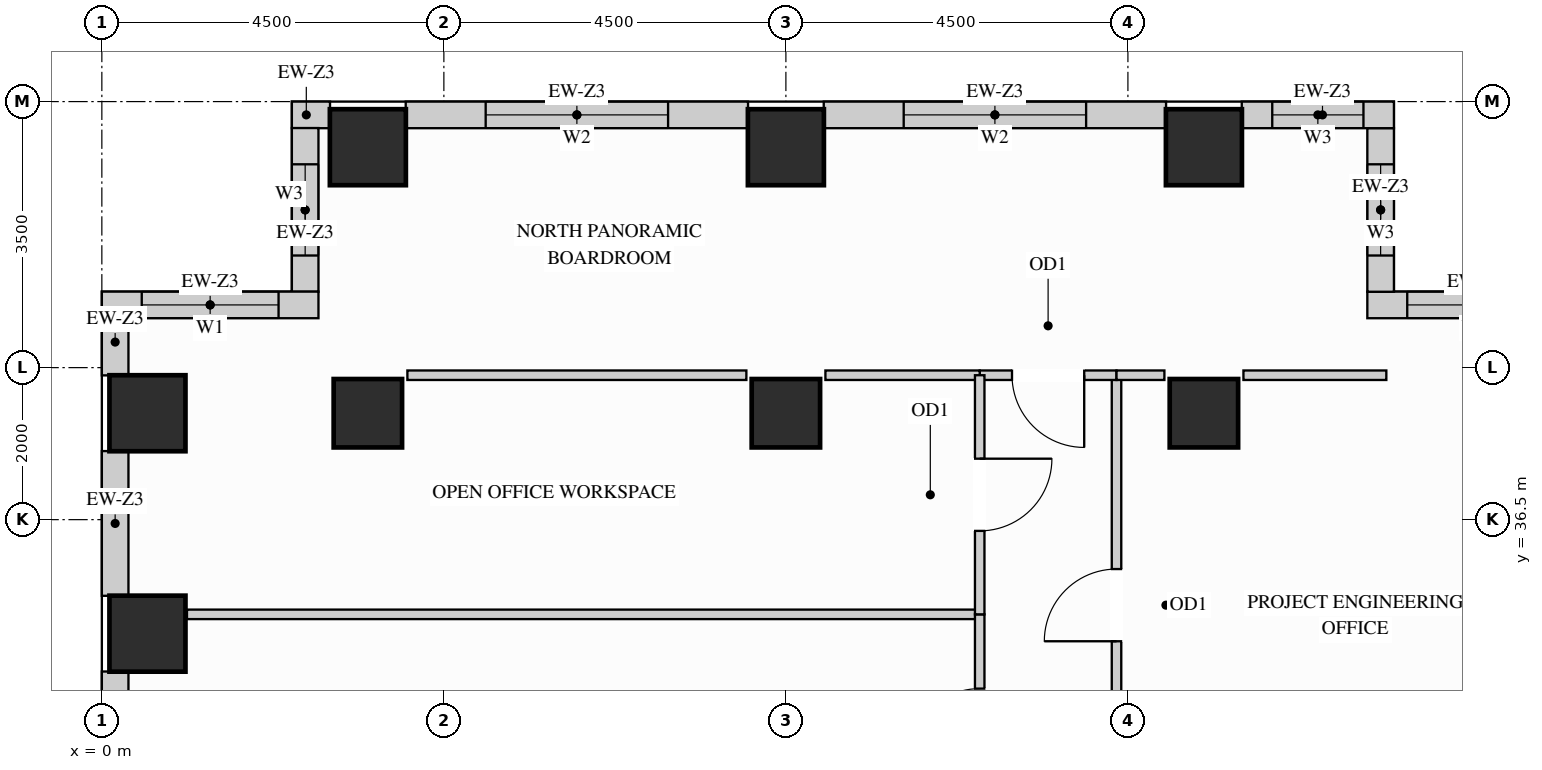
"""IFC4 building model, lengths in metres.
Left out: names, types, materials, properties, quantities, classifications, styles, units other than length and angle.
Written with IfcOpenShell. Run it as: python <this file> out.ifc"""

import sys

from ifc_helpers import new_model, si_unit, direction, frame, frame_2d, origin, origin_2d, place, context, subcontext, project, spatial, rectangle, extrude, source, transform, mapped, element, fill, save


model = new_model("IFC4")
c1 = context("Model", 3, precision=1e-05, world=origin(), true_north=direction((0.0, 1.0)))
c2 = subcontext(c1, "Body", "Model", "MODEL_VIEW")
j1 = project(units=[si_unit("LENGTHUNIT", "METRE"), si_unit("PLANEANGLEUNIT", "RADIAN")], contexts=[c1])
p1 = place(None, origin())
s1 = spatial("IfcSite", under=j1, at=p1, CompositionType="ELEMENT")
p2 = place(p1, origin())
s2 = spatial("IfcBuilding", under=s1, at=p2, CompositionType="ELEMENT")
p3 = place(p2, frame((0.0, 0.0, 146.7)))
s3 = spatial("IfcBuildingStorey", under=s2, at=p3, CompositionType="ELEMENT", Elevation=146.7)
m1 = source(origin(), c2, "Body", "SweptSolid", [
    extrude(rectangle(XDim=0.9, YDim=0.9, at=origin_2d()), origin(), (0.0, 0.0, 1.0), 3.4),
])
for number, where, z_axis, x_axis in (
    (1, (14.5, 37.9, 0.0), (0.0, 0.0, 1.0), (1.0, 0.0, 0.0)),
    (2, (3.5, 37.9, 0.0), (0.0, 0.0, 1.0), (1.0, 0.0, 0.0)),
    (3, (9.0, 37.9, 0.0), (0.0, 0.0, 1.0), (1.0, 0.0, 0.0)),
):
    element("IfcColumn", number, at=place(p3, frame(where, z_axis=z_axis, x_axis=x_axis)), inside=s3, PredefinedType="COLUMN", context=c2, shape_type="MappedRepresentation", body=[
        mapped(m1, transform((0.0, 0.0, 0.0), x_axis=(1.0, 0.0, 0.0), y_axis=(0.0, 1.0, 0.0), z_axis=(0.0, 0.0, 1.0))),
    ])
m2 = source(origin(), c2, "Body", "SweptSolid", [
    extrude(rectangle(XDim=1.0, YDim=1.0, at=origin_2d()), origin(), (0.0, 0.0, 1.0), 3.4),
])
for number, where, z_axis, x_axis in (
    (4, (14.5, 41.4, 0.0), (0.0, 0.0, 1.0), (1.0, 0.0, 0.0)),
    (5, (3.5, 41.4, 0.0), (0.0, 0.0, 1.0), (1.0, 0.0, 0.0)),
    (6, (9.0, 41.4, 0.0), (0.0, 0.0, 1.0), (1.0, 0.0, 0.0)),
    (7, (0.6, 35.0, 0.0), (0.0, 0.0, 1.0), (1.0, 0.0, 0.0)),
    (8, (0.6, 37.9, 0.0), (0.0, 0.0, 1.0), (1.0, 0.0, 0.0)),
):
    element("IfcColumn", number, at=place(p3, frame(where, z_axis=z_axis, x_axis=x_axis)), inside=s3, PredefinedType="COLUMN", context=c2, shape_type="MappedRepresentation", body=[
        mapped(m2, transform((0.0, 0.0, 0.0), x_axis=(1.0, 0.0, 0.0), y_axis=(0.0, 1.0, 0.0), z_axis=(0.0, 0.0, 1.0))),
    ])
p4 = place(p3, frame((19.5, 39.325, 0.0), z_axis=(0.0, 0.0, 1.0), x_axis=(-1.0, 0.0, 0.0)))
e9 = element("IfcWall", 9, at=p4, inside=s3, PredefinedType="SOLIDWALL", context=c2, shape_type="SweptSolid", body=[
    extrude(rectangle(XDim=2.85, YDim=0.35, at=frame_2d((1.425, 0.0))), origin(), (0.0, 0.0, 1.0), 3.385),
])
p5 = place(p4, frame((0.525, 0.0, 0.78)))
e10 = element("IfcOpeningElement", 10, at=p5, cuts=e9, PredefinedType="OPENING", context=c2, shape_type="SweptSolid", body=[
    extrude(rectangle(XDim=1.8, YDim=2.1, at=frame_2d((0.9, 1.05))), frame((0.0, 0.185, 0.0), z_axis=(0.0, -1.0, 0.0), x_axis=(1.0, 0.0, 0.0)), (0.0, 0.0, 1.0), 0.37),
])
p6 = place(p3, frame((16.825, 39.498, 0.0), z_axis=(0.0, 0.0, 1.0), x_axis=(0.0, 1.0, 0.0)))
e11 = element("IfcWall", 11, at=p6, inside=s3, PredefinedType="SOLIDWALL", context=c2, shape_type="SweptSolid", body=[
    extrude(rectangle(XDim=2.154, YDim=0.35, at=frame_2d((1.077, 0.0))), origin(), (0.0, 0.0, 1.0), 3.385),
])
p7 = place(p6, frame((0.477, 0.0, 0.78)))
e12 = element("IfcOpeningElement", 12, at=p7, cuts=e11, PredefinedType="OPENING", context=c2, shape_type="SweptSolid", body=[
    extrude(rectangle(XDim=1.2, YDim=2.1, at=frame_2d((0.6, 1.05))), frame((0.0, 0.185, 0.0), z_axis=(0.0, -1.0, 0.0), x_axis=(1.0, 0.0, 0.0)), (0.0, 0.0, 1.0), 0.37),
])
p8 = place(p3, frame((17.0, 41.825, 0.0), z_axis=(0.0, 0.0, 1.0), x_axis=(-1.0, 0.0, 0.0)))
e13 = element("IfcWall", 13, at=p8, inside=s3, PredefinedType="SOLIDWALL", context=c2, shape_type="SweptSolid", body=[
    extrude(rectangle(XDim=2.002, YDim=0.35, at=frame_2d((1.001, 0.0))), origin(), (0.0, 0.0, 1.0), 3.385),
])
p9 = place(p8, frame((0.401, 0.0, 0.78)))
e14 = element("IfcOpeningElement", 14, at=p9, cuts=e13, PredefinedType="OPENING", context=c2, shape_type="SweptSolid", body=[
    extrude(rectangle(XDim=1.2, YDim=2.1, at=frame_2d((0.6, 1.05))), frame((0.0, 0.185, 0.0), z_axis=(0.0, -1.0, 0.0), x_axis=(1.0, 0.0, 0.0)), (0.0, 0.0, 1.0), 0.37),
])
p10 = place(p3, frame((14.002, 41.825, 0.0), z_axis=(0.0, 0.0, 1.0), x_axis=(-1.0, 0.0, 0.0)))
e15 = element("IfcWall", 15, at=p10, inside=s3, PredefinedType="SOLIDWALL", context=c2, shape_type="SweptSolid", body=[
    extrude(rectangle(XDim=4.504, YDim=0.35, at=frame_2d((2.252, 0.0))), origin(), (0.0, 0.0, 1.0), 2.612),
])
p11 = place(p10, frame((1.052, 0.0, 0.78)))
e16 = element("IfcOpeningElement", 16, at=p11, cuts=e15, PredefinedType="OPENING", context=c2, shape_type="SweptSolid", body=[
    extrude(rectangle(XDim=2.4, YDim=1.652, at=frame_2d((1.2, 0.826))), frame((0.0, 0.185, 0.0), z_axis=(0.0, -1.0, 0.0), x_axis=(1.0, 0.0, 0.0)), (0.0, 0.0, 1.0), 0.37),
])
p12 = place(p3, frame((8.502, 41.825, 0.0), z_axis=(0.0, 0.0, 1.0), x_axis=(-1.0, 0.0, 0.0)))
e17 = element("IfcWall", 17, at=p12, inside=s3, PredefinedType="SOLIDWALL", context=c2, shape_type="SweptSolid", body=[
    extrude(rectangle(XDim=4.504, YDim=0.35, at=frame_2d((2.252, 0.0))), origin(), (0.0, 0.0, 1.0), 2.612),
])
p13 = place(p12, frame((1.052, 0.0, 0.78)))
e18 = element("IfcOpeningElement", 18, at=p13, cuts=e17, PredefinedType="OPENING", context=c2, shape_type="SweptSolid", body=[
    extrude(rectangle(XDim=2.4, YDim=1.652, at=frame_2d((1.2, 0.826))), frame((0.0, 0.185, 0.0), z_axis=(0.0, -1.0, 0.0), x_axis=(1.0, 0.0, 0.0)), (0.0, 0.0, 1.0), 0.37),
])
m3 = source(origin(), c2, "Body", "SweptSolid", [
    extrude(rectangle(XDim=0.502, YDim=0.35, at=frame_2d((0.251, 0.0))), origin(), (0.0, 0.0, 1.0), 3.385),
])
p14 = place(p3, frame((3.002, 41.825, 0.0), z_axis=(0.0, 0.0, 1.0), x_axis=(-1.0, 0.0, 0.0)))
e19 = element("IfcWall", 19, at=p14, inside=s3, PredefinedType="SOLIDWALL", context=c2, shape_type="MappedRepresentation", body=[
    mapped(m3, transform((0.0, 0.0, 0.0), x_axis=(1.0, 0.0, 0.0), y_axis=(0.0, 1.0, 0.0), z_axis=(0.0, 0.0, 1.0))),
])
p15 = place(p3, frame((2.675, 41.652, 0.0), z_axis=(0.0, 0.0, 1.0), x_axis=(0.0, -1.0, 0.0)))
e20 = element("IfcWall", 20, at=p15, inside=s3, PredefinedType="SOLIDWALL", context=c2, shape_type="SweptSolid", body=[
    extrude(rectangle(XDim=2.154, YDim=0.35, at=frame_2d((1.077, 0.0))), origin(), (0.0, 0.0, 1.0), 3.385),
])
p16 = place(p15, frame((0.477, 0.0, 0.78)))
e21 = element("IfcOpeningElement", 21, at=p16, cuts=e20, PredefinedType="OPENING", context=c2, shape_type="SweptSolid", body=[
    extrude(rectangle(XDim=1.2, YDim=2.1, at=frame_2d((0.6, 1.05))), frame((0.0, 0.185, 0.0), z_axis=(0.0, -1.0, 0.0), x_axis=(1.0, 0.0, 0.0)), (0.0, 0.0, 1.0), 0.37),
])
p17 = place(p3, frame((2.85, 39.325, 0.0), z_axis=(0.0, 0.0, 1.0), x_axis=(-1.0, 0.0, 0.0)))
e22 = element("IfcWall", 22, at=p17, inside=s3, PredefinedType="SOLIDWALL", context=c2, shape_type="SweptSolid", body=[
    extrude(rectangle(XDim=2.85, YDim=0.35, at=frame_2d((1.425, 0.0))), origin(), (0.0, 0.0, 1.0), 3.385),
])
p18 = place(p17, frame((0.525, 0.0, 0.78)))
e23 = element("IfcOpeningElement", 23, at=p18, cuts=e22, PredefinedType="OPENING", context=c2, shape_type="SweptSolid", body=[
    extrude(rectangle(XDim=1.8, YDim=2.1, at=frame_2d((0.9, 1.05))), frame((0.0, 0.185, 0.0), z_axis=(0.0, -1.0, 0.0), x_axis=(1.0, 0.0, 0.0)), (0.0, 0.0, 1.0), 0.37),
])
m4 = source(origin(), c2, "Body", "SweptSolid", [
    extrude(rectangle(XDim=0.754, YDim=0.35, at=frame_2d((0.377, 0.0))), origin(), (0.0, 0.0, 1.0), 3.385),
])
p19 = place(p3, frame((0.175, 39.152, 0.0), z_axis=(0.0, 0.0, 1.0), x_axis=(0.0, -1.0, 0.0)))
e24 = element("IfcWall", 24, at=p19, inside=s3, PredefinedType="SOLIDWALL", context=c2, shape_type="MappedRepresentation", body=[
    mapped(m4, transform((0.0, 0.0, 0.0), x_axis=(1.0, 0.0, 0.0), y_axis=(0.0, 1.0, 0.0), z_axis=(0.0, 0.0, 1.0))),
])
m5 = source(origin(), c2, "Body", "SweptSolid", [
    extrude(rectangle(XDim=1.904, YDim=0.35, at=frame_2d((0.952, 0.0))), origin(), (0.0, 0.0, 1.0), 2.612),
])
p20 = place(p3, frame((0.175, 37.402, 0.0), z_axis=(0.0, 0.0, 1.0), x_axis=(0.0, -1.0, 0.0)))
e25 = element("IfcWall", 25, at=p20, inside=s3, PredefinedType="SOLIDWALL", context=c2, shape_type="MappedRepresentation", body=[
    mapped(m5, transform((0.0, 0.0, 0.0), x_axis=(1.0, 0.0, 0.0), y_axis=(0.0, 1.0, 0.0), z_axis=(0.0, 0.0, 1.0))),
])
p21 = place(p3, frame((0.175, 34.502, 0.0), z_axis=(0.0, 0.0, 1.0), x_axis=(0.0, -1.0, 0.0)))
e26 = element("IfcWall", 26, at=p21, inside=s3, PredefinedType="SOLIDWALL", context=c2, shape_type="SweptSolid", body=[
    extrude(rectangle(XDim=3.504, YDim=0.35, at=frame_2d((1.752, 0.0))), origin(), (0.0, 0.0, 1.0), 2.612),
])
p22 = place(p21, frame((0.511, 0.0, 0.78)))
e27 = element("IfcOpeningElement", 27, at=p22, cuts=e26, PredefinedType="OPENING", context=c2, shape_type="SweptSolid", body=[
    extrude(rectangle(XDim=1.2, YDim=1.652, at=frame_2d((0.6, 0.826))), frame((0.0, 0.185, 0.0), z_axis=(0.0, -1.0, 0.0), x_axis=(1.0, 0.0, 0.0)), (0.0, 0.0, 1.0), 0.37),
])
m6 = source(origin(), c2, "Body", "SweptSolid", [
    extrude(rectangle(XDim=10.43, YDim=0.125, at=frame_2d((5.215, 0.0))), origin(), (0.0, 0.0, 1.0), 3.385),
])
p23 = place(p3, frame((1.12, 35.254, 0.0), z_axis=(0.0, 0.0, 1.0), x_axis=(1.0, 0.0, 0.0)))
e28 = element("IfcWall", 28, at=p23, inside=s3, PredefinedType="PARTITIONING", context=c2, shape_type="MappedRepresentation", body=[
    mapped(m6, transform((0.0, 0.0, 0.0), x_axis=(1.0, 0.0, 0.0), y_axis=(0.0, 1.0, 0.0), z_axis=(0.0, 0.0, 1.0))),
])
p24 = place(p3, frame((13.35, 32.35, 0.0), z_axis=(0.0, 0.0, 1.0), x_axis=(0.0, 1.0, 0.0)))
e29 = element("IfcWall", 29, at=p24, inside=s3, PredefinedType="PARTITIONING", context=c2, shape_type="SweptSolid", body=[
    extrude(rectangle(XDim=6.05, YDim=0.125, at=frame_2d((3.025, 0.0))), origin(), (0.0, 0.0, 1.0), 3.385),
])
p25 = place(p24, frame((2.55, 0.0, 0.0)))
e30 = element("IfcOpeningElement", 30, at=p25, cuts=e29, PredefinedType="OPENING", context=c2, shape_type="SweptSolid", body=[
    extrude(rectangle(XDim=0.95, YDim=2.15, at=frame_2d((0.475, 1.075))), frame((0.0, 0.073, 0.0), z_axis=(0.0, -1.0, 0.0), x_axis=(1.0, 0.0, 0.0)), (0.0, 0.0, 1.0), 0.145),
])
p26 = place(p3, frame((11.55, 38.4, 0.0), z_axis=(0.0, 0.0, 1.0), x_axis=(1.0, 0.0, 0.0)))
e31 = element("IfcWall", 31, at=p26, inside=s3, PredefinedType="PARTITIONING", context=c2, shape_type="SweptSolid", body=[
    extrude(rectangle(XDim=1.8, YDim=0.125, at=frame_2d((0.9, 0.0))), origin(), (0.0, 0.0, 1.0), 3.385),
])
p27 = place(p26, frame((0.425, 0.0, 0.0)))
e32 = element("IfcOpeningElement", 32, at=p27, cuts=e31, PredefinedType="OPENING", context=c2, shape_type="SweptSolid", body=[
    extrude(rectangle(XDim=0.95, YDim=2.15, at=frame_2d((0.475, 1.075))), frame((0.0, 0.073, 0.0), z_axis=(0.0, -1.0, 0.0), x_axis=(1.0, 0.0, 0.0)), (0.0, 0.0, 1.0), 0.145),
])
m7 = source(origin(), c2, "Body", "SweptSolid", [
    extrude(rectangle(XDim=0.63, YDim=0.125, at=frame_2d((0.315, 0.0))), origin(), (0.0, 0.0, 1.0), 3.385),
])
p28 = place(p3, frame((13.35, 38.4, 0.0), z_axis=(0.0, 0.0, 1.0), x_axis=(1.0, 0.0, 0.0)))
e33 = element("IfcWall", 33, at=p28, inside=s3, PredefinedType="PARTITIONING", context=c2, shape_type="MappedRepresentation", body=[
    mapped(m7, transform((0.0, 0.0, 0.0), x_axis=(1.0, 0.0, 0.0), y_axis=(0.0, 1.0, 0.0), z_axis=(0.0, 0.0, 1.0))),
])
m8 = source(origin(), c2, "Body", "SweptSolid", [
    extrude(rectangle(XDim=1.88, YDim=0.125, at=frame_2d((0.94, 0.0))), origin(), (0.0, 0.0, 1.0), 3.385),
])
p29 = place(p3, frame((15.02, 38.4, 0.0), z_axis=(0.0, 0.0, 1.0), x_axis=(1.0, 0.0, 0.0)))
e34 = element("IfcWall", 34, at=p29, inside=s3, PredefinedType="PARTITIONING", context=c2, shape_type="MappedRepresentation", body=[
    mapped(m8, transform((0.0, 0.0, 0.0), x_axis=(1.0, 0.0, 0.0), y_axis=(0.0, 1.0, 0.0), z_axis=(0.0, 0.0, 1.0))),
])
m9 = source(origin(), c2, "Body", "SweptSolid", [
    extrude(rectangle(XDim=4.46, YDim=0.125, at=frame_2d((2.23, 0.0))), origin(), (0.0, 0.0, 1.0), 3.385),
])
p30 = place(p3, frame((4.02, 38.4, 0.0), z_axis=(0.0, 0.0, 1.0), x_axis=(1.0, 0.0, 0.0)))
e35 = element("IfcWall", 35, at=p30, inside=s3, PredefinedType="PARTITIONING", context=c2, shape_type="MappedRepresentation", body=[
    mapped(m9, transform((0.0, 0.0, 0.0), x_axis=(1.0, 0.0, 0.0), y_axis=(0.0, 1.0, 0.0), z_axis=(0.0, 0.0, 1.0))),
])
m10 = source(origin(), c2, "Body", "SweptSolid", [
    extrude(rectangle(XDim=2.03, YDim=0.125, at=frame_2d((1.015, 0.0))), origin(), (0.0, 0.0, 1.0), 3.385),
])
p31 = place(p3, frame((9.52, 38.4, 0.0), z_axis=(0.0, 0.0, 1.0), x_axis=(1.0, 0.0, 0.0)))
e36 = element("IfcWall", 36, at=p31, inside=s3, PredefinedType="PARTITIONING", context=c2, shape_type="MappedRepresentation", body=[
    mapped(m10, transform((0.0, 0.0, 0.0), x_axis=(1.0, 0.0, 0.0), y_axis=(0.0, 1.0, 0.0), z_axis=(0.0, 0.0, 1.0))),
])
p32 = place(p3, frame((11.55, 32.35, 0.0), z_axis=(0.0, 0.0, 1.0), x_axis=(0.0, 1.0, 0.0)))
e37 = element("IfcWall", 37, at=p32, inside=s3, PredefinedType="PARTITIONING", context=c2, shape_type="SweptSolid", body=[
    extrude(rectangle(XDim=2.904, YDim=0.125, at=frame_2d((1.452, 0.0))), origin(), (0.0, 0.0, 1.0), 3.385),
])
p33 = place(p32, frame((0.977, 0.0, 0.0)))
e38 = element("IfcOpeningElement", 38, at=p33, cuts=e37, PredefinedType="OPENING", context=c2, shape_type="SweptSolid", body=[
    extrude(rectangle(XDim=0.95, YDim=2.15, at=frame_2d((0.475, 1.075))), frame((0.0, 0.073, 0.0), z_axis=(0.0, -1.0, 0.0), x_axis=(1.0, 0.0, 0.0)), (0.0, 0.0, 1.0), 0.145),
])
p34 = place(p3, frame((11.55, 35.254, 0.0), z_axis=(0.0, 0.0, 1.0), x_axis=(0.0, 1.0, 0.0)))
e39 = element("IfcWall", 39, at=p34, inside=s3, PredefinedType="PARTITIONING", context=c2, shape_type="SweptSolid", body=[
    extrude(rectangle(XDim=3.146, YDim=0.125, at=frame_2d((1.573, 0.0))), origin(), (0.0, 0.0, 1.0), 3.385),
])
p35 = place(p34, frame((1.098, 0.0, 0.0)))
e40 = element("IfcOpeningElement", 40, at=p35, cuts=e39, PredefinedType="OPENING", context=c2, shape_type="SweptSolid", body=[
    extrude(rectangle(XDim=0.95, YDim=2.15, at=frame_2d((0.475, 1.075))), frame((0.0, 0.073, 0.0), z_axis=(0.0, -1.0, 0.0), x_axis=(1.0, 0.0, 0.0)), (0.0, 0.0, 1.0), 0.145),
])
m11 = source(origin(), c2, "Body", "SweptSolid", [
    extrude(rectangle(XDim=0.95, YDim=2.15, at=frame_2d((0.475, 1.075))), frame((0.0, 0.025, 0.0), z_axis=(0.0, -1.0, 0.0), x_axis=(1.0, 0.0, 0.0)), (0.0, 0.0, 1.0), 0.05),
])
p36 = place(p25, origin())
e41 = element("IfcDoor", 41, at=p36, inside=s3, OperationType="SINGLE_SWING_LEFT", PredefinedType="DOOR", context=c2, shape_type="MappedRepresentation", body=[
    mapped(m11, transform((0.0, 0.0, 0.0), x_axis=(1.0, 0.0, 0.0), y_axis=(0.0, 1.0, 0.0), z_axis=(0.0, 0.0, 1.0))),
])
fill(e30, e41)
p37 = place(p27, origin())
e42 = element("IfcDoor", 42, at=p37, inside=s3, OperationType="SINGLE_SWING_RIGHT", PredefinedType="DOOR", context=c2, shape_type="MappedRepresentation", body=[
    mapped(m11, transform((0.0, 0.0, 0.0), x_axis=(1.0, 0.0, 0.0), y_axis=(0.0, 1.0, 0.0), z_axis=(0.0, 0.0, 1.0))),
])
fill(e32, e42)
p38 = place(p33, origin())
e43 = element("IfcDoor", 43, at=p38, inside=s3, OperationType="SINGLE_SWING_LEFT", PredefinedType="DOOR", context=c2, shape_type="MappedRepresentation", body=[
    mapped(m11, transform((0.0, 0.0, 0.0), x_axis=(1.0, 0.0, 0.0), y_axis=(0.0, 1.0, 0.0), z_axis=(0.0, 0.0, 1.0))),
])
fill(e38, e43)
p39 = place(p35, origin())
e44 = element("IfcDoor", 44, at=p39, inside=s3, OperationType="SINGLE_SWING_RIGHT", PredefinedType="DOOR", context=c2, shape_type="MappedRepresentation", body=[
    mapped(m11, transform((0.0, 0.0, 0.0), x_axis=(1.0, 0.0, 0.0), y_axis=(0.0, 1.0, 0.0), z_axis=(0.0, 0.0, 1.0))),
])
fill(e40, e44)
m12 = source(origin(), c2, "Body", "SweptSolid", [
    extrude(rectangle(XDim=1.8, YDim=2.1, at=frame_2d((0.9, 1.05))), frame((0.0, 0.03, 0.0), z_axis=(0.0, -1.0, 0.0), x_axis=(1.0, 0.0, 0.0)), (0.0, 0.0, 1.0), 0.06),
])
p40 = place(p5, origin())
e45 = element("IfcWindow", 45, at=p40, inside=s3, PartitioningType="SINGLE_PANEL", PredefinedType="WINDOW", context=c2, shape_type="MappedRepresentation", body=[
    mapped(m12, transform((0.0, 0.0, 0.0), x_axis=(1.0, 0.0, 0.0), y_axis=(0.0, 1.0, 0.0), z_axis=(0.0, 0.0, 1.0))),
])
fill(e10, e45)
p41 = place(p18, origin())
e46 = element("IfcWindow", 46, at=p41, inside=s3, PartitioningType="SINGLE_PANEL", PredefinedType="WINDOW", context=c2, shape_type="MappedRepresentation", body=[
    mapped(m12, transform((0.0, 0.0, 0.0), x_axis=(1.0, 0.0, 0.0), y_axis=(0.0, 1.0, 0.0), z_axis=(0.0, 0.0, 1.0))),
])
fill(e23, e46)
m13 = source(origin(), c2, "Body", "SweptSolid", [
    extrude(rectangle(XDim=2.4, YDim=1.652, at=frame_2d((1.2, 0.826))), frame((0.0, 0.03, 0.0), z_axis=(0.0, -1.0, 0.0), x_axis=(1.0, 0.0, 0.0)), (0.0, 0.0, 1.0), 0.06),
])
p42 = place(p11, origin())
e47 = element("IfcWindow", 47, at=p42, inside=s3, PartitioningType="SINGLE_PANEL", PredefinedType="WINDOW", context=c2, shape_type="MappedRepresentation", body=[
    mapped(m13, transform((0.0, 0.0, 0.0), x_axis=(1.0, 0.0, 0.0), y_axis=(0.0, 1.0, 0.0), z_axis=(0.0, 0.0, 1.0))),
])
fill(e16, e47)
p43 = place(p13, origin())
e48 = element("IfcWindow", 48, at=p43, inside=s3, PartitioningType="SINGLE_PANEL", PredefinedType="WINDOW", context=c2, shape_type="MappedRepresentation", body=[
    mapped(m13, transform((0.0, 0.0, 0.0), x_axis=(1.0, 0.0, 0.0), y_axis=(0.0, 1.0, 0.0), z_axis=(0.0, 0.0, 1.0))),
])
fill(e18, e48)
m14 = source(origin(), c2, "Body", "SweptSolid", [
    extrude(rectangle(XDim=1.2, YDim=2.1, at=frame_2d((0.6, 1.05))), frame((0.0, 0.03, 0.0), z_axis=(0.0, -1.0, 0.0), x_axis=(1.0, 0.0, 0.0)), (0.0, 0.0, 1.0), 0.06),
])
p44 = place(p7, origin())
e49 = element("IfcWindow", 49, at=p44, inside=s3, PartitioningType="SINGLE_PANEL", PredefinedType="WINDOW", context=c2, shape_type="MappedRepresentation", body=[
    mapped(m14, transform((0.0, 0.0, 0.0), x_axis=(1.0, 0.0, 0.0), y_axis=(0.0, 1.0, 0.0), z_axis=(0.0, 0.0, 1.0))),
])
fill(e12, e49)
p45 = place(p9, origin())
e50 = element("IfcWindow", 50, at=p45, inside=s3, PartitioningType="SINGLE_PANEL", PredefinedType="WINDOW", context=c2, shape_type="MappedRepresentation", body=[
    mapped(m14, transform((0.0, 0.0, 0.0), x_axis=(1.0, 0.0, 0.0), y_axis=(0.0, 1.0, 0.0), z_axis=(0.0, 0.0, 1.0))),
])
fill(e14, e50)
p46 = place(p16, origin())
e51 = element("IfcWindow", 51, at=p46, inside=s3, PartitioningType="SINGLE_PANEL", PredefinedType="WINDOW", context=c2, shape_type="MappedRepresentation", body=[
    mapped(m14, transform((0.0, 0.0, 0.0), x_axis=(1.0, 0.0, 0.0), y_axis=(0.0, 1.0, 0.0), z_axis=(0.0, 0.0, 1.0))),
])
fill(e21, e51)
save(model, sys.argv[1])
